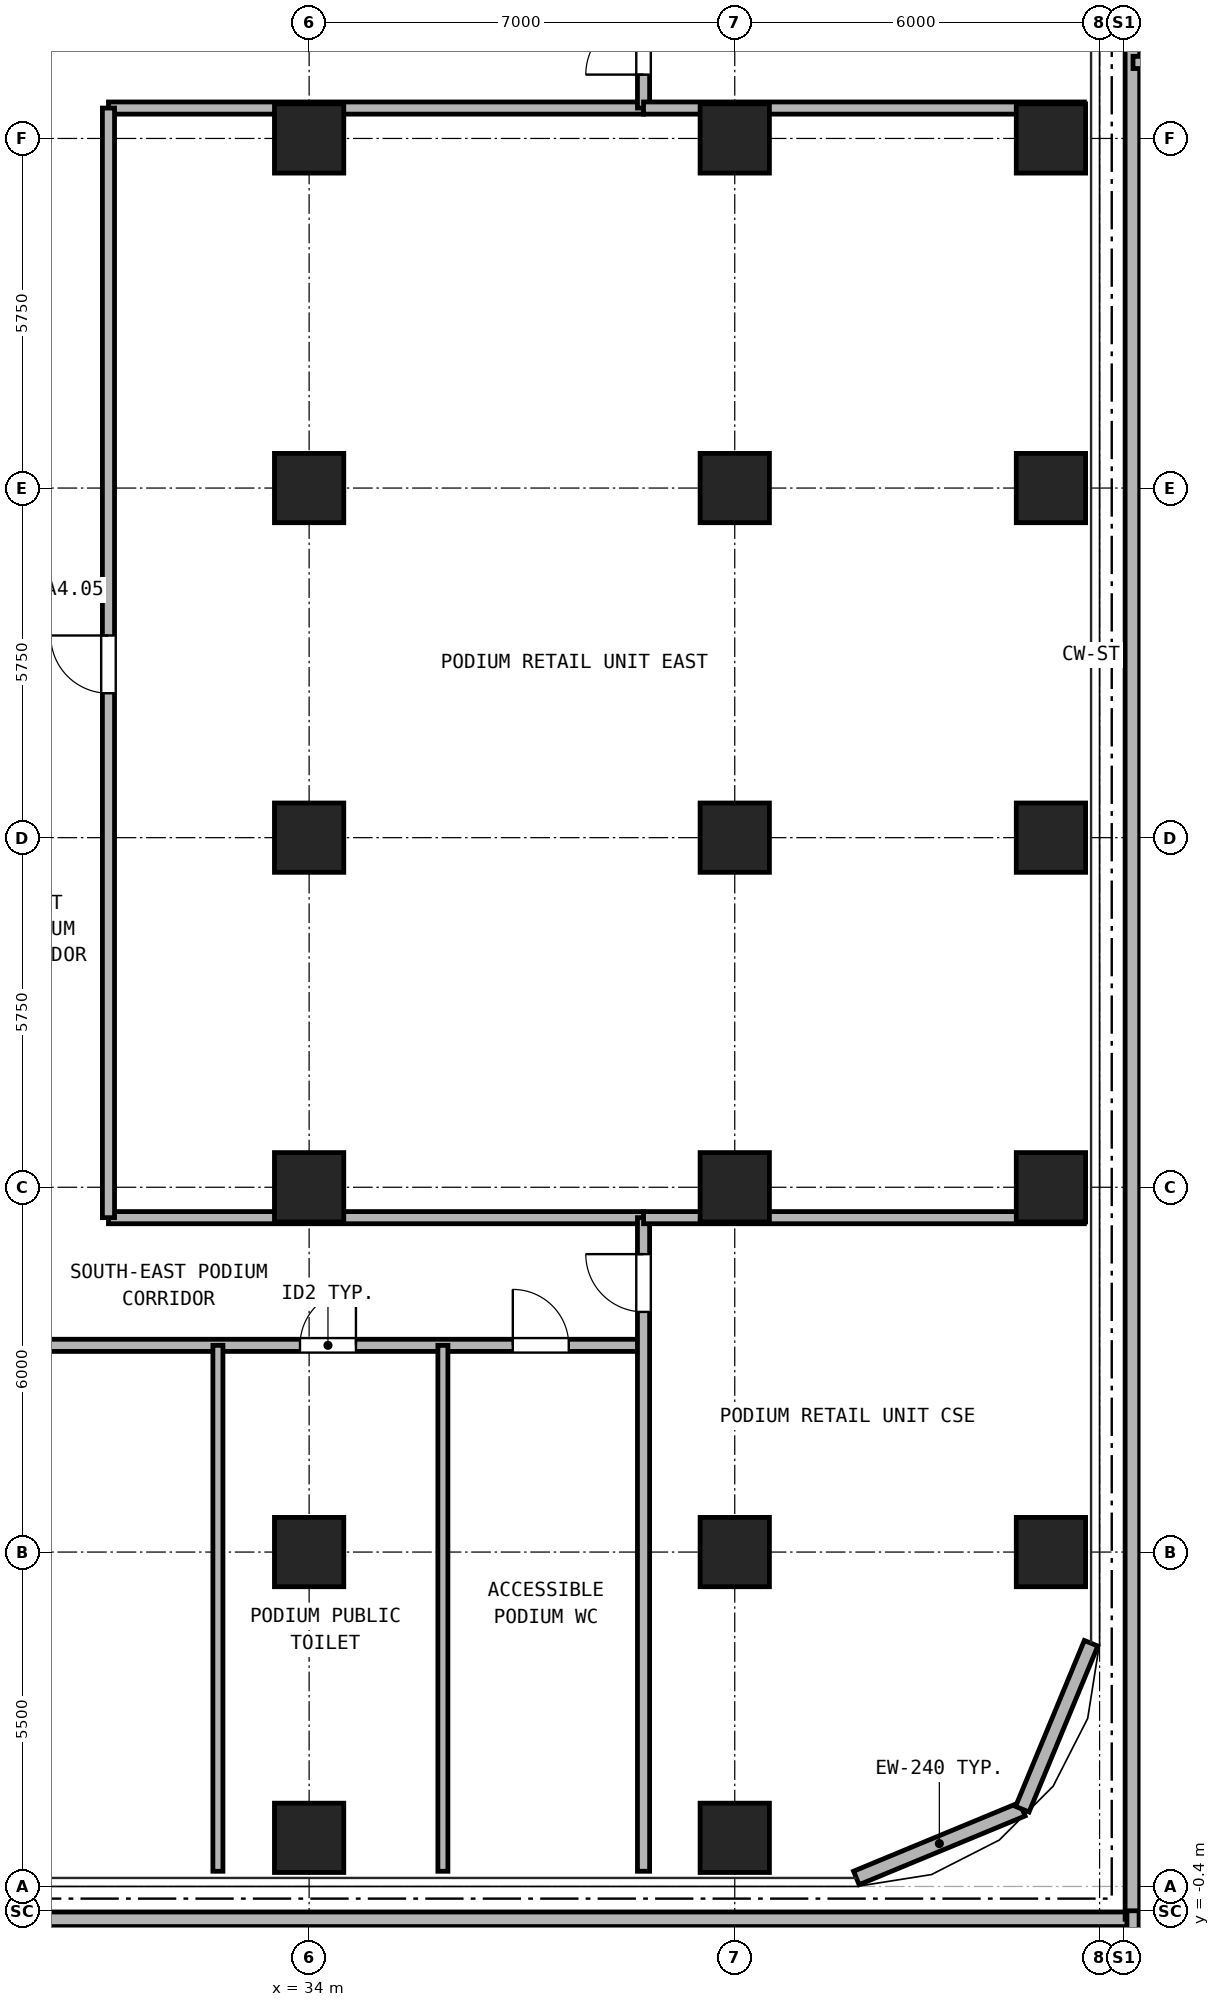
"""IFC4 building model, lengths in metres.
Left out: names, types, materials, properties, quantities, classifications, styles, units other than length and angle.
Written with IfcOpenShell. Run it as: python <this file> out.ifc"""

import sys

from ifc_helpers import new_model, si_unit, direction, frame, frame_2d, origin, origin_2d, place, context, subcontext, project, spatial, rectangle, hollow_rectangle, extrude, source, transform, mapped, element, fill, save


model = new_model("IFC4")
c1 = context("Model", 3, precision=1e-05, world=origin(), true_north=direction((0.0, 1.0)))
c2 = subcontext(c1, "Body", "Model", "MODEL_VIEW")
j1 = project(units=[si_unit("LENGTHUNIT", "METRE"), si_unit("PLANEANGLEUNIT", "RADIAN")], contexts=[c1])
p1 = place(None, origin())
s1 = spatial("IfcSite", under=j1, at=p1, CompositionType="ELEMENT")
p2 = place(p1, origin())
s2 = spatial("IfcBuilding", under=s1, at=p2, CompositionType="ELEMENT")
p3 = place(p2, frame((0.0, 0.0, 4.5)))
s3 = spatial("IfcBuildingStorey", under=s2, at=p3, CompositionType="ELEMENT", Elevation=4.5)
m1 = source(origin(), c2, "Body", "SweptSolid", [
    extrude(hollow_rectangle(XDim=1.14, YDim=1.14, WallThickness=0.07, at=origin_2d()), origin(), (0.0, 0.0, 1.0), 4.18),
])
for number, where, z_axis, x_axis in (
    (1, (34.0, 0.8, 0.0), (0.0, 0.0, 1.0), (1.0, 0.0, 0.0)),
    (2, (41.0, 0.8, 0.0), (0.0, 0.0, 1.0), (1.0, 0.0, 0.0)),
    (3, (46.2, 5.5, 0.0), (0.0, 0.0, 1.0), (1.0, 0.0, 0.0)),
    (4, (46.2, 11.5, 0.0), (0.0, 0.0, 1.0), (1.0, 0.0, 0.0)),
    (5, (46.2, 17.25, 0.0), (0.0, 0.0, 1.0), (1.0, 0.0, 0.0)),
    (6, (46.2, 23.0, 0.0), (0.0, 0.0, 1.0), (1.0, 0.0, 0.0)),
    (7, (46.2, 28.75, 0.0), (0.0, 0.0, 1.0), (1.0, 0.0, 0.0)),
    (8, (34.0, 5.5, 0.0), (0.0, 0.0, 1.0), (1.0, 0.0, 0.0)),
    (9, (34.0, 11.5, 0.0), (0.0, 0.0, 1.0), (1.0, 0.0, 0.0)),
    (10, (34.0, 17.25, 0.0), (0.0, 0.0, 1.0), (1.0, 0.0, 0.0)),
    (11, (34.0, 23.0, 0.0), (0.0, 0.0, 1.0), (1.0, 0.0, 0.0)),
    (12, (34.0, 28.75, 0.0), (0.0, 0.0, 1.0), (1.0, 0.0, 0.0)),
    (13, (41.0, 5.5, 0.0), (0.0, 0.0, 1.0), (1.0, 0.0, 0.0)),
    (14, (41.0, 11.5, 0.0), (0.0, 0.0, 1.0), (1.0, 0.0, 0.0)),
    (15, (41.0, 17.25, 0.0), (0.0, 0.0, 1.0), (1.0, 0.0, 0.0)),
    (16, (41.0, 23.0, 0.0), (0.0, 0.0, 1.0), (1.0, 0.0, 0.0)),
    (17, (41.0, 28.75, 0.0), (0.0, 0.0, 1.0), (1.0, 0.0, 0.0)),
):
    element("IfcColumn", number, at=place(p3, frame(where, z_axis=z_axis, x_axis=x_axis)), inside=s3, PredefinedType="COLUMN", context=c2, shape_type="MappedRepresentation", body=[
        mapped(m1, transform((0.0, 0.0, 0.0), x_axis=(1.0, 0.0, 0.0), y_axis=(0.0, 1.0, 0.0), z_axis=(0.0, 0.0, 1.0), scale=1.0)),
    ])
for number, where, z_axis, x_axis in (
    (18, (43.0, 0.14, 0.0), (0.0, 0.0, 1.0), (0.924, 0.383, 0.0)),
    (19, (45.729, 1.271, 0.0), (0.0, 0.0, 1.0), (0.383, 0.924, 0.0)),
):
    element("IfcWall", number, at=place(p3, frame(where, z_axis=z_axis, x_axis=x_axis)), inside=s3, PredefinedType="SOLIDWALL", context=c2, shape_type="SweptSolid", body=[
        extrude(rectangle(XDim=2.954, YDim=0.24, at=frame_2d((1.477, 0.0))), origin(), (0.0, 0.0, 1.0), 4.18),
    ])
p4 = place(p3, frame((0.2, -0.54, 0.0), z_axis=(0.0, 0.0, 1.0), x_axis=(1.0, 0.0, 0.0)))
e20 = element("IfcWall", 20, at=p4, inside=s3, PredefinedType="SOLIDWALL", context=c2, shape_type="SweptSolid", body=[
    extrude(rectangle(XDim=47.34, YDim=0.24, at=frame_2d((23.67, 0.0))), origin(), (0.0, 0.0, 1.0), 4.18),
])
p5 = place(p3, frame((47.54, -0.54, 0.0), z_axis=(0.0, 0.0, 1.0), x_axis=(0.0, 1.0, 0.0)))
e21 = element("IfcWall", 21, at=p5, inside=s3, PredefinedType="SOLIDWALL", context=c2, shape_type="SweptSolid", body=[
    extrude(rectangle(XDim=40.89, YDim=0.24, at=frame_2d((20.445, 0.0))), origin(), (0.0, 0.0, 1.0), 4.18),
])
p6 = place(p3, frame((7.5, 8.9, 0.0), z_axis=(0.0, 0.0, 1.0), x_axis=(1.0, 0.0, 0.0)))
e22 = element("IfcWall", 22, at=p6, inside=s3, PredefinedType="PARTITIONING", context=c2, shape_type="SweptSolid", body=[
    extrude(rectangle(XDim=32.0, YDim=0.2, at=frame_2d((16.0, 0.0))), origin(), (0.0, 0.0, 1.0), 4.18),
])
p7 = place(p6, frame((7.0, 0.0, 0.0)))
e23 = element("IfcOpeningElement", 23, at=p7, cuts=e22, PredefinedType="OPENING", context=c2, shape_type="SweptSolid", body=[
    extrude(rectangle(XDim=0.95, YDim=2.15, at=frame_2d((0.475, 1.075))), frame((0.0, 0.11, 0.0), z_axis=(0.0, -1.0, 0.0), x_axis=(1.0, 0.0, 0.0)), (0.0, 0.0, 1.0), 0.22),
])
p8 = place(p6, frame((19.5, 0.0, 0.0)))
e24 = element("IfcOpeningElement", 24, at=p8, cuts=e22, PredefinedType="OPENING", context=c2, shape_type="SweptSolid", body=[
    extrude(rectangle(XDim=0.95, YDim=2.15, at=frame_2d((0.475, 1.075))), frame((0.0, 0.11, 0.0), z_axis=(0.0, -1.0, 0.0), x_axis=(1.0, 0.0, 0.0)), (0.0, 0.0, 1.0), 0.22),
])
p9 = place(p6, frame((26.35, 0.0, 0.0)))
e25 = element("IfcOpeningElement", 25, at=p9, cuts=e22, PredefinedType="OPENING", context=c2, shape_type="SweptSolid", body=[
    extrude(rectangle(XDim=0.92, YDim=2.1, at=frame_2d((0.46, 1.05))), frame((0.0, 0.11, 0.0), z_axis=(0.0, -1.0, 0.0), x_axis=(1.0, 0.0, 0.0)), (0.0, 0.0, 1.0), 0.22),
])
p10 = place(p6, frame((29.85, 0.0, 0.0)))
e26 = element("IfcOpeningElement", 26, at=p10, cuts=e22, PredefinedType="OPENING", context=c2, shape_type="SweptSolid", body=[
    extrude(rectangle(XDim=0.92, YDim=2.1, at=frame_2d((0.46, 1.05))), frame((0.0, 0.11, 0.0), z_axis=(0.0, -1.0, 0.0), x_axis=(1.0, 0.0, 0.0)), (0.0, 0.0, 1.0), 0.22),
])
for number, where, z_axis, x_axis in (
    (27, (30.7, 11.0, 0.0), (0.0, 0.0, 1.0), (1.0, 0.0, 0.0)),
    (28, (30.7, 29.25, 0.0), (0.0, 0.0, 1.0), (1.0, 0.0, 0.0)),
):
    element("IfcWall", number, at=place(p3, frame(where, z_axis=z_axis, x_axis=x_axis)), inside=s3, PredefinedType="PARTITIONING", context=c2, shape_type="SweptSolid", body=[
        extrude(rectangle(XDim=8.8, YDim=0.2, at=frame_2d((4.4, 0.0))), origin(), (0.0, 0.0, 1.0), 4.18),
    ])
p11 = place(p3, frame((30.7, 11.0, 0.0), z_axis=(0.0, 0.0, 1.0), x_axis=(0.0, 1.0, 0.0)))
e29 = element("IfcWall", 29, at=p11, inside=s3, PredefinedType="PARTITIONING", context=c2, shape_type="SweptSolid", body=[
    extrude(rectangle(XDim=18.25, YDim=0.2, at=frame_2d((9.125, 0.0))), origin(), (0.0, 0.0, 1.0), 4.18),
])
p12 = place(p11, frame((8.625, 0.0, 0.0)))
e30 = element("IfcOpeningElement", 30, at=p12, cuts=e29, PredefinedType="OPENING", context=c2, shape_type="SweptSolid", body=[
    extrude(rectangle(XDim=0.95, YDim=2.15, at=frame_2d((0.475, 1.075))), frame((0.0, 0.11, 0.0), z_axis=(0.0, -1.0, 0.0), x_axis=(1.0, 0.0, 0.0)), (0.0, 0.0, 1.0), 0.22),
])
p13 = place(p3, frame((39.5, 0.25, 0.0), z_axis=(0.0, 0.0, 1.0), x_axis=(0.0, 1.0, 0.0)))
e31 = element("IfcWall", 31, at=p13, inside=s3, PredefinedType="PARTITIONING", context=c2, shape_type="SweptSolid", body=[
    extrude(rectangle(XDim=10.75, YDim=0.2, at=frame_2d((5.375, 0.0))), origin(), (0.0, 0.0, 1.0), 4.18),
])
p14 = place(p13, frame((9.2, 0.0, 0.0)))
e32 = element("IfcOpeningElement", 32, at=p14, cuts=e31, PredefinedType="OPENING", context=c2, shape_type="SweptSolid", body=[
    extrude(rectangle(XDim=0.95, YDim=2.15, at=frame_2d((0.475, 1.075))), frame((0.0, 0.11, 0.0), z_axis=(0.0, -1.0, 0.0), x_axis=(1.0, 0.0, 0.0)), (0.0, 0.0, 1.0), 0.22),
])
p15 = place(p3, frame((39.5, 29.25, 0.0), z_axis=(0.0, 0.0, 1.0), x_axis=(0.0, 1.0, 0.0)))
e33 = element("IfcWall", 33, at=p15, inside=s3, PredefinedType="PARTITIONING", context=c2, shape_type="SweptSolid", body=[
    extrude(rectangle(XDim=11.0, YDim=0.2, at=frame_2d((5.5, 0.0))), origin(), (0.0, 0.0, 1.0), 4.18),
])
p16 = place(p15, frame((0.55, 0.0, 0.0)))
e34 = element("IfcOpeningElement", 34, at=p16, cuts=e33, PredefinedType="OPENING", context=c2, shape_type="SweptSolid", body=[
    extrude(rectangle(XDim=0.95, YDim=2.15, at=frame_2d((0.475, 1.075))), frame((0.0, 0.11, 0.0), z_axis=(0.0, -1.0, 0.0), x_axis=(1.0, 0.0, 0.0)), (0.0, 0.0, 1.0), 0.22),
])
for number, where, z_axis, x_axis in (
    (35, (39.5, 11.0, 0.0), (0.0, 0.0, 1.0), (1.0, 0.0, 0.0)),
    (36, (39.5, 29.25, 0.0), (0.0, 0.0, 1.0), (1.0, 0.0, 0.0)),
):
    element("IfcWall", number, at=place(p3, frame(where, z_axis=z_axis, x_axis=x_axis)), inside=s3, PredefinedType="PARTITIONING", context=c2, shape_type="SweptSolid", body=[
        extrude(rectangle(XDim=7.25, YDim=0.2, at=frame_2d((3.625, 0.0))), origin(), (0.0, 0.0, 1.0), 4.18),
    ])
for number, where, z_axis, x_axis in (
    (37, (32.5, 0.25, 0.0), (0.0, 0.0, 1.0), (0.0, 1.0, 0.0)),
    (38, (36.2, 0.25, 0.0), (0.0, 0.0, 1.0), (0.0, 1.0, 0.0)),
):
    element("IfcWall", number, at=place(p3, frame(where, z_axis=z_axis, x_axis=x_axis)), inside=s3, PredefinedType="PARTITIONING", context=c2, shape_type="SweptSolid", body=[
        extrude(rectangle(XDim=8.65, YDim=0.165, at=frame_2d((4.325, 0.0))), origin(), (0.0, 0.0, 1.0), 4.18),
    ])
p17 = place(p3, frame((47.55, 30.0, 0.0), z_axis=(0.0, 0.0, 1.0), x_axis=(1.0, 0.0, 0.0)))
e39 = element("IfcWall", 39, at=p17, inside=s3, PredefinedType="PARTITIONING", context=c2, shape_type="SweptSolid", body=[
    extrude(rectangle(XDim=23.9, YDim=0.2, at=frame_2d((11.95, 0.0))), origin(), (0.0, 0.0, 1.0), 4.18),
])
p18 = place(p17, frame((3.45, 0.0, 0.0)))
e40 = element("IfcOpeningElement", 40, at=p18, cuts=e39, PredefinedType="OPENING", context=c2, shape_type="SweptSolid", body=[
    extrude(rectangle(XDim=1.0, YDim=2.1, at=frame_2d((0.5, 1.05))), frame((0.0, 0.11, 0.0), z_axis=(0.0, -1.0, 0.0), x_axis=(1.0, 0.0, 0.0)), (0.0, 0.0, 1.0), 0.22),
])
p19 = place(p3, frame((47.55, -10.95, 0.0), z_axis=(0.0, 0.0, 1.0), x_axis=(0.0, 1.0, 0.0)))
e41 = element("IfcWall", 41, at=p19, inside=s3, PredefinedType="PARTITIONING", context=c2, shape_type="SweptSolid", body=[
    extrude(rectangle(XDim=10.55, YDim=0.2, at=frame_2d((5.275, 0.0))), origin(), (0.0, 0.0, 1.0), 4.18),
])
p20 = place(p19, frame((5.35, 0.0, 0.0)))
e42 = element("IfcOpeningElement", 42, at=p20, cuts=e41, PredefinedType="OPENING", context=c2, shape_type="SweptSolid", body=[
    extrude(rectangle(XDim=1.3, YDim=2.2, at=frame_2d((0.65, 1.1))), frame((0.0, 0.11, 0.0), z_axis=(0.0, -1.0, 0.0), x_axis=(1.0, 0.0, 0.0)), (0.0, 0.0, 1.0), 0.22),
])
p21 = place(p9, frame((0.92, 0.0, 0.0), z_axis=(0.0, 0.0, 1.0), x_axis=(-1.0, 0.0, 0.0)))
e43 = element("IfcDoor", 43, at=p21, inside=s3, OperationType="SINGLE_SWING_RIGHT", PredefinedType="DOOR", context=c2, shape_type="SweptSolid", body=[
    extrude(rectangle(XDim=0.92, YDim=2.1, at=frame_2d((0.46, 1.05))), frame((0.0, 0.025, 0.0), z_axis=(0.0, -1.0, 0.0), x_axis=(1.0, 0.0, 0.0)), (0.0, 0.0, 1.0), 0.05),
])
fill(e25, e43)
p22 = place(p10, frame((0.92, 0.0, 0.0), z_axis=(0.0, 0.0, 1.0), x_axis=(-1.0, 0.0, 0.0)))
e44 = element("IfcDoor", 44, at=p22, inside=s3, OperationType="SINGLE_SWING_LEFT", PredefinedType="DOOR", context=c2, shape_type="SweptSolid", body=[
    extrude(rectangle(XDim=0.92, YDim=2.1, at=frame_2d((0.46, 1.05))), frame((0.0, 0.025, 0.0), z_axis=(0.0, -1.0, 0.0), x_axis=(1.0, 0.0, 0.0)), (0.0, 0.0, 1.0), 0.05),
])
fill(e26, e44)
p23 = place(p14, origin())
e45 = element("IfcDoor", 45, at=p23, inside=s3, OperationType="SINGLE_SWING_RIGHT", PredefinedType="DOOR", context=c2, shape_type="SweptSolid", body=[
    extrude(rectangle(XDim=0.95, YDim=2.15, at=frame_2d((0.475, 1.075))), frame((0.0, 0.025, 0.0), z_axis=(0.0, -1.0, 0.0), x_axis=(1.0, 0.0, 0.0)), (0.0, 0.0, 1.0), 0.05),
])
fill(e32, e45)
p24 = place(p16, origin())
e46 = element("IfcDoor", 46, at=p24, inside=s3, OperationType="SINGLE_SWING_LEFT", PredefinedType="DOOR", context=c2, shape_type="SweptSolid", body=[
    extrude(rectangle(XDim=0.95, YDim=2.15, at=frame_2d((0.475, 1.075))), frame((0.0, 0.025, 0.0), z_axis=(0.0, -1.0, 0.0), x_axis=(1.0, 0.0, 0.0)), (0.0, 0.0, 1.0), 0.05),
])
fill(e34, e46)
p25 = place(p12, origin())
e47 = element("IfcDoor", 47, at=p25, inside=s3, OperationType="SINGLE_SWING_RIGHT", PredefinedType="DOOR", context=c2, shape_type="SweptSolid", body=[
    extrude(rectangle(XDim=0.95, YDim=2.15, at=frame_2d((0.475, 1.075))), frame((0.0, 0.025, 0.0), z_axis=(0.0, -1.0, 0.0), x_axis=(1.0, 0.0, 0.0)), (0.0, 0.0, 1.0), 0.05),
])
fill(e30, e47)
save(model, sys.argv[1])
